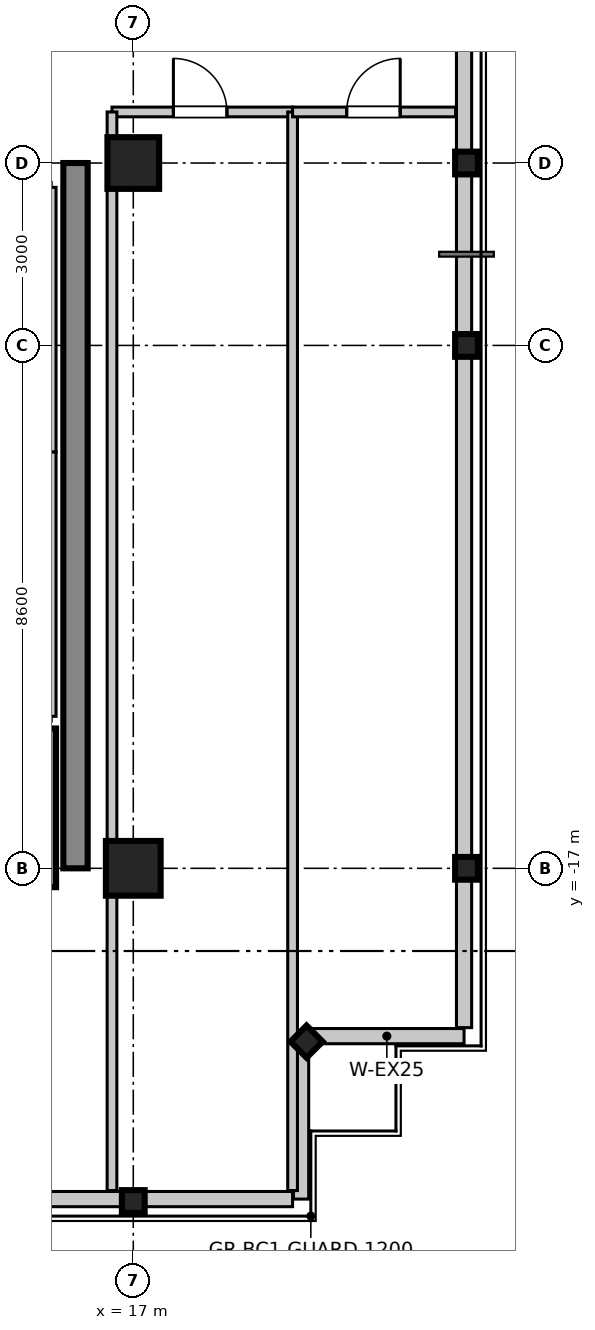
"""IFC4 building model, lengths in metres.
Left out: names, types, materials, properties, quantities, classifications, styles, units other than length and angle.
Written with IfcOpenShell. Run it as: python <this file> out.ifc"""

import sys

from ifc_helpers import new_model, si_unit, direction, frame, frame_2d, origin, origin_2d, place, context, subcontext, project, spatial, rectangle, i_section, extrude, source, transform, mapped, element, fill, save


model = new_model("IFC4")
c1 = context("Model", 3, precision=1e-05, world=origin(), true_north=direction((0.0, 1.0)))
c2 = subcontext(c1, "Body", "Model", "MODEL_VIEW")
j1 = project(units=[si_unit("LENGTHUNIT", "METRE"), si_unit("PLANEANGLEUNIT", "RADIAN")], contexts=[c1])
p1 = place(None, origin())
s1 = spatial("IfcSite", under=j1, at=p1, CompositionType="ELEMENT")
p2 = place(p1, origin())
s2 = spatial("IfcBuilding", under=s1, at=p2, CompositionType="ELEMENT")
p3 = place(p2, frame((0.0, 0.0, 300.35)))
s3 = spatial("IfcBuildingStorey", under=s2, at=p3, CompositionType="ELEMENT", Elevation=300.35)
m1 = source(origin(), c2, "Body", "SweptSolid", [
    extrude(rectangle(XDim=0.9, YDim=0.9, at=origin_2d()), origin(), (0.0, 0.0, 1.0), 3.805),
])
p4 = place(p3, frame((17.0, -17.0, 0.0), z_axis=(0.0, 0.0, 1.0), x_axis=(1.0, 0.0, 0.0)))
e1 = element("IfcColumn", 1, at=p4, inside=s3, PredefinedType="COLUMN", context=c2, shape_type="MappedRepresentation", body=[
    mapped(m1, transform((0.0, 0.0, 0.0), scale=1.0)),
])
m2 = source(origin(), c2, "Body", "SweptSolid", [
    extrude(rectangle(XDim=0.85, YDim=0.85, at=origin_2d()), origin(), (0.0, 0.0, 1.0), 3.805),
])
p5 = place(p3, frame((17.0, -5.4, 0.0), z_axis=(0.0, 0.0, 1.0), x_axis=(1.0, 0.0, 0.0)))
e2 = element("IfcColumn", 2, at=p5, inside=s3, PredefinedType="PILASTER", context=c2, shape_type="MappedRepresentation", body=[
    mapped(m2, transform((0.0, 0.0, 0.0), scale=1.0)),
])
m3 = source(origin(), c2, "Body", "SweptSolid", [
    extrude(i_section(OverallWidth=0.374, OverallDepth=0.374, WebThickness=0.014, FlangeThickness=0.023, at=origin_2d()), origin(), (0.0, 0.0, 1.0), 3.805),
])
for number, where, z_axis, x_axis in (
    (3, (22.48, -17.0, 0.0), (0.0, 0.0, 1.0), (1.0, 0.0, 0.0)),
    (4, (22.48, -8.4, 0.0), (0.0, 0.0, 1.0), (1.0, 0.0, 0.0)),
    (5, (22.48, -5.4, 0.0), (0.0, 0.0, 1.0), (1.0, 0.0, 0.0)),
    (6, (17.0, -22.48, 0.0), (0.0, 0.0, 1.0), (0.0, 1.0, 0.0)),
    (7, (19.85, -19.85, 0.0), (0.0, 0.0, 1.0), (0.707, 0.707, 0.0)),
):
    element("IfcColumn", number, at=place(p3, frame(where, z_axis=z_axis, x_axis=x_axis)), inside=s3, PredefinedType="COLUMN", context=c2, shape_type="MappedRepresentation", body=[
        mapped(m3, transform((0.0, 0.0, 0.0), scale=1.0)),
    ])
m4 = source(origin(), c2, "Body", "SweptSolid", [
    extrude(rectangle(XDim=11.6, YDim=0.4, at=frame_2d((5.8, 0.0))), origin(), (0.0, 0.0, 1.0), 3.55),
])
p6 = place(p3, frame((16.05, -17.0, 0.0), z_axis=(0.0, 0.0, 1.0), x_axis=(0.0, 1.0, 0.0)))
e8 = element("IfcWall", 8, at=p6, inside=s3, PredefinedType="SHEAR", context=c2, shape_type="MappedRepresentation", body=[
    mapped(m4, transform((0.0, 0.0, 0.0), scale=1.0)),
])
m5 = source(origin(), c2, "Body", "SweptSolid", [
    extrude(rectangle(XDim=2.61, YDim=0.22, at=frame_2d((1.305, 0.0))), origin(), (0.0, 0.0, 1.0), 3.55),
])
p7 = place(p3, frame((15.62, -17.31, 0.0), z_axis=(0.0, 0.0, 1.0), x_axis=(0.0, 1.0, 0.0)))
e9 = element("IfcWall", 9, at=p7, inside=s3, PredefinedType="SHEAR", context=c2, shape_type="MappedRepresentation", body=[
    mapped(m5, transform((0.0, 0.0, 0.0), scale=1.0)),
])
m6 = source(origin(), c2, "Body", "SweptSolid", [
    extrude(rectangle(XDim=27.34, YDim=0.25, at=frame_2d((13.67, 0.0))), origin(), (0.0, 0.0, 1.0), 2.89),
])
p8 = place(p3, frame((-7.72, -22.44, 0.0), z_axis=(0.0, 0.0, 1.0), x_axis=(1.0, 0.0, 0.0)))
e10 = element("IfcWall", 10, at=p8, inside=s3, PredefinedType="STANDARD", context=c2, shape_type="MappedRepresentation", body=[
    mapped(m6, transform((0.0, 0.0, 0.0), scale=1.0)),
])
m7 = source(origin(), c2, "Body", "SweptSolid", [
    extrude(rectangle(XDim=2.54, YDim=0.25, at=frame_2d((1.27, 0.0))), origin(), (0.0, 0.0, 1.0), 2.89),
])
for number, where, z_axis, x_axis in (
    (11, (19.76, -22.44, 0.0), (0.0, 0.0, 1.0), (0.0, 1.0, 0.0)),
    (12, (19.9, -19.76, 0.0), (0.0, 0.0, 1.0), (1.0, 0.0, 0.0)),
):
    element("IfcWall", number, at=place(p3, frame(where, z_axis=z_axis, x_axis=x_axis)), inside=s3, PredefinedType="STANDARD", context=c2, shape_type="MappedRepresentation", body=[
        mapped(m7, transform((0.0, 0.0, 0.0), scale=1.0)),
    ])
m8 = source(origin(), c2, "Body", "SweptSolid", [
    extrude(rectangle(XDim=16.12, YDim=0.25, at=frame_2d((8.06, 0.0))), origin(), (0.0, 0.0, 1.0), 2.89),
])
p9 = place(p3, frame((22.44, -19.62, 0.0), z_axis=(0.0, 0.0, 1.0), x_axis=(0.0, 1.0, 0.0)))
e13 = element("IfcWall", 13, at=p9, inside=s3, PredefinedType="STANDARD", context=c2, shape_type="MappedRepresentation", body=[
    mapped(m8, transform((0.0, 0.0, 0.0), scale=1.0)),
])
m9 = source(origin(), c2, "Body", "SweptSolid", [
    extrude(rectangle(XDim=4.35, YDim=0.16, at=frame_2d((2.175, 0.0))), origin(), (0.0, 0.0, 1.0), 2.89),
])
p10 = place(p3, frame((15.65, -14.5, 0.0), z_axis=(0.0, 0.0, 1.0), x_axis=(0.0, 1.0, 0.0)))
e14 = element("IfcWall", 14, at=p10, inside=s3, PredefinedType="PARTITIONING", context=c2, shape_type="MappedRepresentation", body=[
    mapped(m9, transform((0.0, 0.0, 0.0), scale=1.0)),
])
m10 = source(origin(), c2, "Body", "SweptSolid", [
    extrude(rectangle(XDim=4.35, YDim=0.16, at=frame_2d((2.175, 0.0))), origin(), (0.0, 0.0, 1.0), 2.89),
])
p11 = place(p3, frame((15.65, -10.15, 0.0), z_axis=(0.0, 0.0, 1.0), x_axis=(0.0, 1.0, 0.0)))
e15 = element("IfcWall", 15, at=p11, inside=s3, PredefinedType="PARTITIONING", context=c2, shape_type="MappedRepresentation", body=[
    mapped(m10, transform((0.0, 0.0, 0.0), scale=1.0)),
])
m11 = source(origin(), c2, "Body", "SweptSolid", [
    extrude(rectangle(XDim=2.97, YDim=0.16, at=frame_2d((1.485, 0.0))), origin(), (0.0, 0.0, 1.0), 2.89),
])
p12 = place(p3, frame((16.65, -4.56, 0.0), z_axis=(0.0, 0.0, 1.0), x_axis=(1.0, 0.0, 0.0)))
e16 = element("IfcWall", 16, at=p12, inside=s3, PredefinedType="PARTITIONING", context=c2, shape_type="MappedRepresentation", body=[
    mapped(m11, transform((0.0, 0.0, 0.0), scale=1.0)),
])
p13 = place(p12, frame((1.01, 0.0, 0.0)))
e17 = element("IfcOpeningElement", 17, at=p13, cuts=e16, PredefinedType="OPENING", context=c2, shape_type="SweptSolid", body=[
    extrude(rectangle(XDim=0.88, YDim=2.1, at=frame_2d((0.44, 1.05))), frame((0.0, 0.09, 0.0), z_axis=(0.0, -1.0, 0.0), x_axis=(1.0, 0.0, 0.0)), (0.0, 0.0, 1.0), 0.18),
])
m12 = source(origin(), c2, "Body", "SweptSolid", [
    extrude(rectangle(XDim=17.74, YDim=0.16, at=frame_2d((8.87, 0.0))), origin(), (0.0, 0.0, 1.0), 2.89),
])
for number, where, z_axis, x_axis in (
    (18, (16.65, -22.3, 0.0), (0.0, 0.0, 1.0), (0.0, 1.0, 0.0)),
    (19, (19.62, -22.3, 0.0), (0.0, 0.0, 1.0), (0.0, 1.0, 0.0)),
):
    element("IfcWall", number, at=place(p3, frame(where, z_axis=z_axis, x_axis=x_axis)), inside=s3, PredefinedType="PARTITIONING", context=c2, shape_type="MappedRepresentation", body=[
        mapped(m12, transform((0.0, 0.0, 0.0), scale=1.0)),
    ])
m13 = source(origin(), c2, "Body", "SweptSolid", [
    extrude(rectangle(XDim=2.68, YDim=0.16, at=frame_2d((1.34, 0.0))), origin(), (0.0, 0.0, 1.0), 2.89),
])
p14 = place(p3, frame((19.62, -4.56, 0.0), z_axis=(0.0, 0.0, 1.0), x_axis=(1.0, 0.0, 0.0)))
e20 = element("IfcWall", 20, at=p14, inside=s3, PredefinedType="PARTITIONING", context=c2, shape_type="MappedRepresentation", body=[
    mapped(m13, transform((0.0, 0.0, 0.0), scale=1.0)),
])
p15 = place(p14, frame((0.89, 0.0, 0.0)))
e21 = element("IfcOpeningElement", 21, at=p15, cuts=e20, PredefinedType="OPENING", context=c2, shape_type="SweptSolid", body=[
    extrude(rectangle(XDim=0.88, YDim=2.1, at=frame_2d((0.44, 1.05))), frame((0.0, 0.09, 0.0), z_axis=(0.0, -1.0, 0.0), x_axis=(1.0, 0.0, 0.0)), (0.0, 0.0, 1.0), 0.18),
])
m14 = source(origin(), c2, "Body", "SweptSolid", [
    extrude(rectangle(XDim=0.88, YDim=2.1, at=frame_2d((0.44, 1.05))), frame((0.0, 0.025, 0.0), z_axis=(0.0, -1.0, 0.0), x_axis=(1.0, 0.0, 0.0)), (0.0, 0.0, 1.0), 0.05),
])
p16 = place(p13, frame((0.88, 0.0, 0.0), z_axis=(0.0, 0.0, 1.0), x_axis=(-1.0, 0.0, 0.0)))
e22 = element("IfcDoor", 22, at=p16, inside=s3, OperationType="SINGLE_SWING_LEFT", PredefinedType="DOOR", context=c2, shape_type="MappedRepresentation", body=[
    mapped(m14, transform((0.0, 0.0, 0.0), scale=1.0)),
])
fill(e17, e22)
p17 = place(p15, frame((0.88, 0.0, 0.0), z_axis=(0.0, 0.0, 1.0), x_axis=(-1.0, 0.0, 0.0)))
e23 = element("IfcDoor", 23, at=p17, inside=s3, OperationType="SINGLE_SWING_RIGHT", PredefinedType="DOOR", context=c2, shape_type="MappedRepresentation", body=[
    mapped(m14, transform((0.0, 0.0, 0.0), scale=1.0)),
])
fill(e21, e23)
save(model, sys.argv[1])
